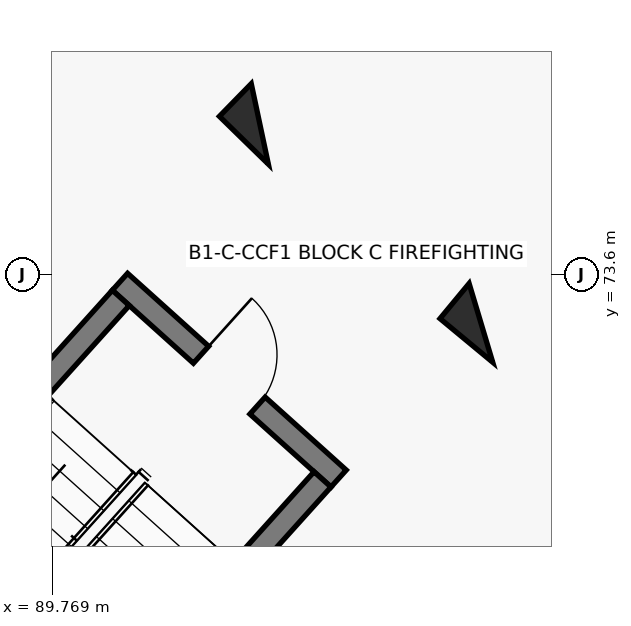
"""IFC4 building model, lengths in metres.
Left out: names, types, materials, properties, quantities, classifications, styles, units other than length and angle.
Written with IfcOpenShell. Run it as: python <this file> out.ifc"""

import sys

from ifc_helpers import new_model, si_unit, direction, frame, frame_2d, origin, origin_2d, place, context, subcontext, project, spatial, rectangle, extrude, element, fill, save


model = new_model("IFC4")
c1 = context("Model", 3, precision=1e-05, world=origin(), true_north=direction((0.0, 1.0)))
c2 = subcontext(c1, "Body", "Model", "MODEL_VIEW")
j1 = project(units=[si_unit("LENGTHUNIT", "METRE"), si_unit("PLANEANGLEUNIT", "RADIAN")], contexts=[c1])
p1 = place(None, origin())
s1 = spatial("IfcSite", under=j1, at=p1, CompositionType="ELEMENT")
p2 = place(p1, origin())
s2 = spatial("IfcBuilding", under=s1, at=p2, CompositionType="ELEMENT")
p3 = place(p2, frame((0.0, 0.0, -3.6)))
s3 = spatial("IfcBuildingStorey", under=s2, at=p3, CompositionType="ELEMENT", Elevation=-3.6)
for number, where, z_axis, x_axis in (
    (1, (92.5, 75.576, 0.0), (0.0, 0.0, 1.0), (-0.699, -0.715, 0.0)),
    (2, (95.409, 72.958, 0.0), (0.0, 0.0, 1.0), (-0.638, -0.77, 0.0)),
):
    element("IfcColumn", number, at=place(p3, frame(where, z_axis=z_axis, x_axis=x_axis)), inside=s3, PredefinedType="COLUMN", context=c2, shape_type="SweptSolid", body=[
        extrude(rectangle(XDim=0.6, YDim=0.9, at=origin_2d()), origin(), (0.0, 0.0, 1.0), 3.6),
    ])
p4 = place(p3, frame((90.66, 73.499, 0.0), z_axis=(0.0, 0.0, 1.0), x_axis=(0.743375696158, -0.668874109501, 0.0)))
e3 = element("IfcWall", 3, at=p4, inside=s3, PredefinedType="SHEAR", context=c2, shape_type="SweptSolid", body=[
    extrude(rectangle(XDim=3.87, YDim=0.3, at=frame_2d((1.935, 0.0))), origin(), (0.0, 0.0, 1.0), 3.6),
])
p5 = place(p4, frame((1.435, 0.0, 0.0)))
e4 = element("IfcOpeningElement", 4, at=p5, cuts=e3, PredefinedType="OPENING", context=c2, shape_type="SweptSolid", body=[
    extrude(rectangle(XDim=1.0, YDim=2.15, at=frame_2d((0.5, 1.075))), frame((0.0, 0.16, 0.0), z_axis=(0.0, -1.0, 0.0), x_axis=(1.0, 0.0, 0.0)), (0.0, 0.0, 1.0), 0.32),
])
p6 = place(p3, frame((90.671, 73.287, 0.0), z_axis=(0.0, 0.0, 1.0), x_axis=(-0.668885797871, -0.743365179038, 0.0)))
e5 = element("IfcWall", 5, at=p6, inside=s3, PredefinedType="SHEAR", context=c2, shape_type="SweptSolid", body=[
    extrude(rectangle(XDim=7.69, YDim=0.3, at=frame_2d((3.845, 0.0))), origin(), (0.0, 0.0, 1.0), 3.6),
])
p7 = place(p3, frame((93.325, 70.899, 0.0), z_axis=(0.0, 0.0, 1.0), x_axis=(-0.668868253964, -0.743380964808, 0.0)))
e6 = element("IfcWall", 6, at=p7, inside=s3, PredefinedType="SHEAR", context=c2, shape_type="SweptSolid", body=[
    extrude(rectangle(XDim=7.69, YDim=0.3, at=frame_2d((3.845, 0.0))), origin(), (0.0, 0.0, 1.0), 3.6),
])
p8 = place(p5, origin())
e7 = element("IfcDoor", 7, at=p8, inside=s3, OperationType="SINGLE_SWING_LEFT", PredefinedType="DOOR", context=c2, shape_type="SweptSolid", body=[
    extrude(rectangle(XDim=1.0, YDim=2.15, at=frame_2d((0.5, 1.075))), frame((0.0, 0.025, 0.0), z_axis=(0.0, -1.0, 0.0), x_axis=(1.0, 0.0, 0.0)), (0.0, 0.0, 1.0), 0.05),
])
fill(e4, e7)
save(model, sys.argv[1])
